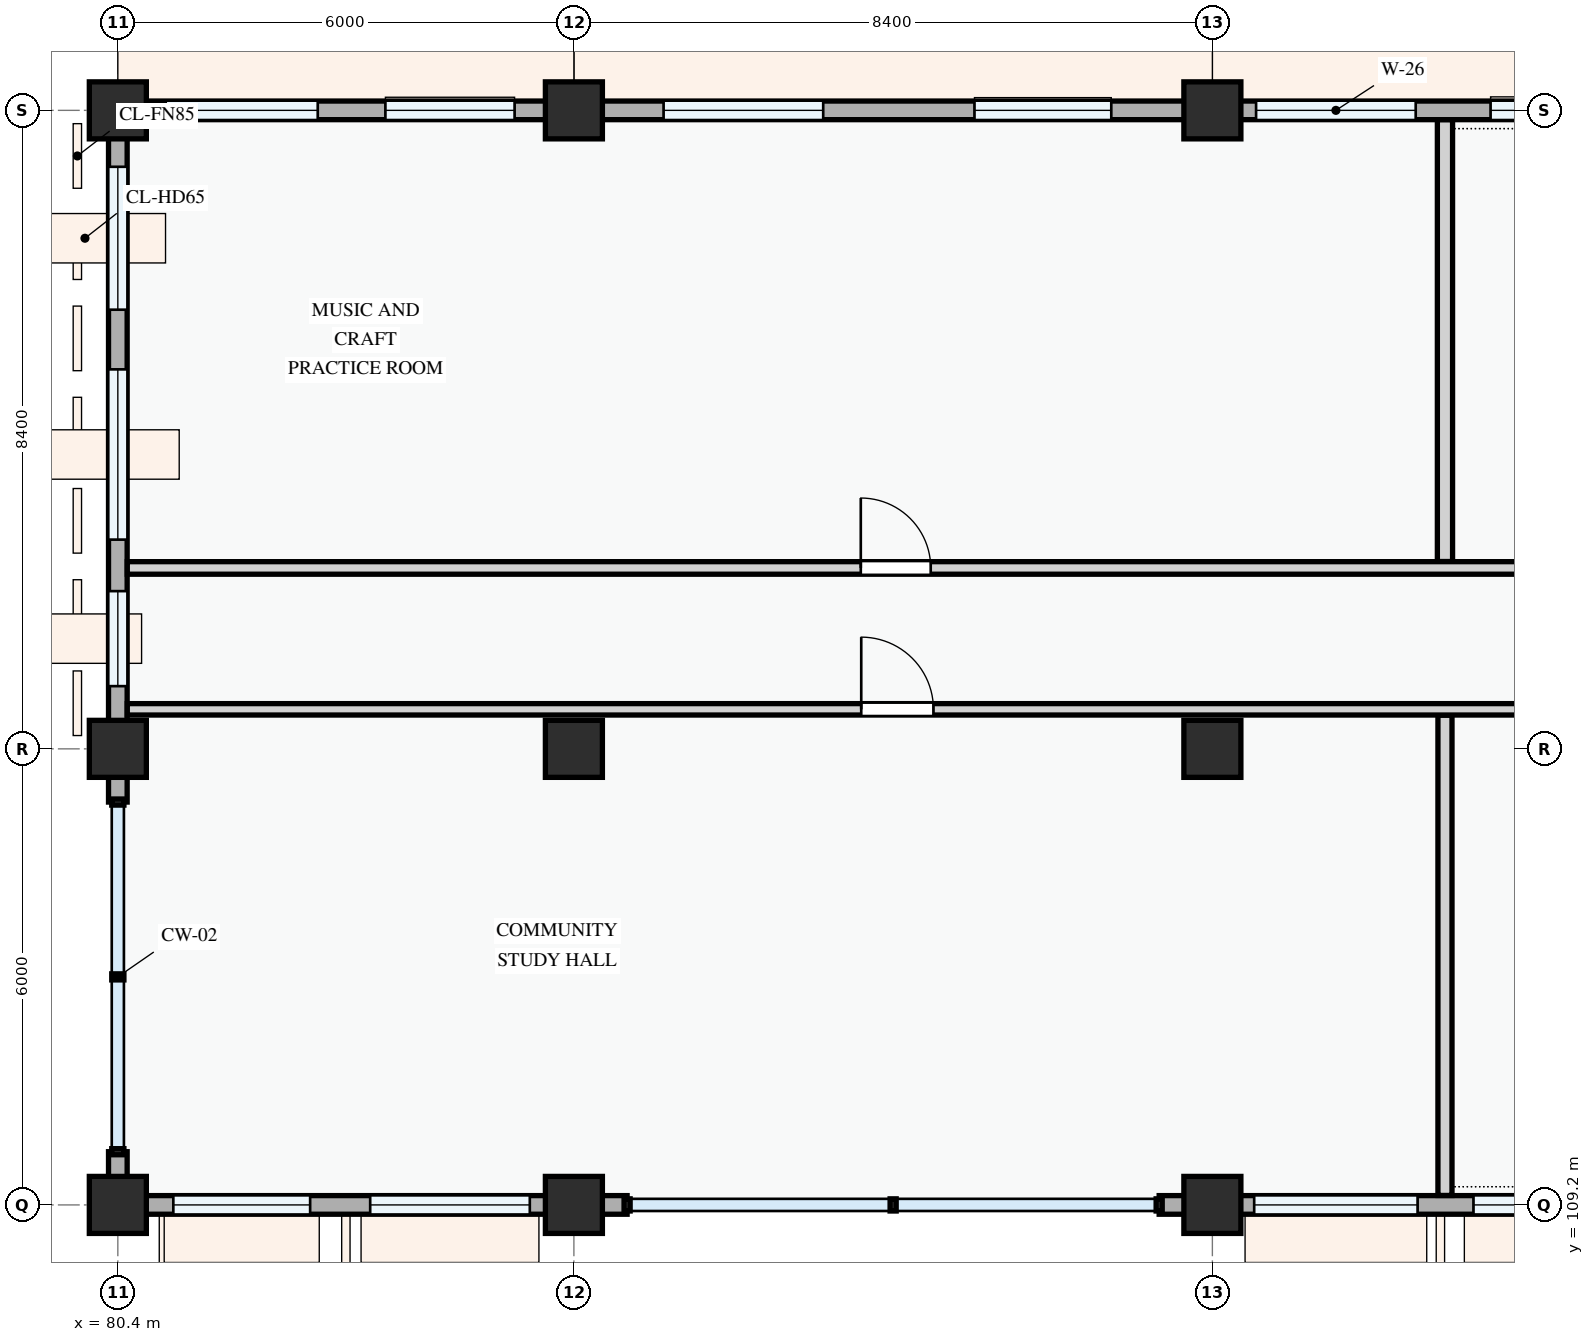
"""IFC4 building model, lengths in metres.
Left out: names, types, materials, properties, quantities, classifications, styles, units other than length and angle.
Written with IfcOpenShell. Run it as: python <this file> out.ifc"""

import sys

from ifc_helpers import new_model, si_unit, direction, frame, frame_2d, origin, origin_2d, place, context, subcontext, project, spatial, rectangle, extrude, element, fill, save


model = new_model("IFC4")
c1 = context("Model", 3, precision=1e-05, world=origin(), true_north=direction((0.0, 1.0)))
c2 = subcontext(c1, "Body", "Model", "MODEL_VIEW")
j1 = project(units=[si_unit("LENGTHUNIT", "METRE"), si_unit("PLANEANGLEUNIT", "RADIAN")], contexts=[c1])
p1 = place(None, origin())
s1 = spatial("IfcSite", under=j1, at=p1, CompositionType="ELEMENT")
p2 = place(p1, origin())
s2 = spatial("IfcBuilding", under=s1, at=p2, CompositionType="ELEMENT")
p3 = place(p2, frame((0.0, 0.0, 4.5)))
s3 = spatial("IfcBuildingStorey", under=s2, at=p3, CompositionType="ELEMENT", Elevation=4.5)
for number, where, z_axis, x_axis in (
    (1, (80.4, 109.2, 0.0), (0.0, 0.0, 1.0), (1.0, 0.0, 0.0)),
    (2, (80.4, 115.2, 0.0), (0.0, 0.0, 1.0), (1.0, 0.0, 0.0)),
    (3, (80.4, 123.6, 0.0), (0.0, 0.0, 1.0), (1.0, 0.0, 0.0)),
    (4, (86.4, 109.2, 0.0), (0.0, 0.0, 1.0), (1.0, 0.0, 0.0)),
    (5, (86.4, 115.2, 0.0), (0.0, 0.0, 1.0), (1.0, 0.0, 0.0)),
    (6, (86.4, 123.6, 0.0), (0.0, 0.0, 1.0), (1.0, 0.0, 0.0)),
    (7, (94.8, 109.2, 0.0), (0.0, 0.0, 1.0), (1.0, 0.0, 0.0)),
    (8, (94.8, 115.2, 0.0), (0.0, 0.0, 1.0), (1.0, 0.0, 0.0)),
    (9, (94.8, 123.6, 0.0), (0.0, 0.0, 1.0), (1.0, 0.0, 0.0)),
):
    element("IfcColumn", number, at=place(p3, frame(where, z_axis=z_axis, x_axis=x_axis)), inside=s3, PredefinedType="COLUMN", context=c2, shape_type="SweptSolid", body=[
        extrude(rectangle(XDim=0.75, YDim=0.75, at=origin_2d()), origin(), (0.0, 0.0, 1.0), 3.6),
    ])
p4 = place(p3, frame((100.8, 123.6, 0.0), z_axis=(0.0, 0.0, 1.0), x_axis=(-1.0, 0.0, 0.0)))
e10 = element("IfcWall", 10, at=p4, inside=s3, PredefinedType="STANDARD", context=c2, shape_type="SweptSolid", body=[
    extrude(rectangle(XDim=6.0, YDim=0.245, at=frame_2d((3.0, 0.0))), origin(), (0.0, 0.0, 1.0), 2.775),
])
p5 = place(p4, frame((0.79, 0.0, 0.78)))
e11 = element("IfcOpeningElement", 11, at=p5, cuts=e10, PredefinedType="OPENING", context=c2, shape_type="SweptSolid", body=[
    extrude(rectangle(XDim=1.55, YDim=1.4, at=frame_2d((0.775, 0.7))), frame((0.0, 0.133, 0.0), z_axis=(0.0, -1.0, 0.0), x_axis=(1.0, 0.0, 0.0)), (0.0, 0.0, 1.0), 0.265),
])
p6 = place(p4, frame((3.325, 0.0, 0.78)))
e12 = element("IfcOpeningElement", 12, at=p6, cuts=e10, PredefinedType="OPENING", context=c2, shape_type="SweptSolid", body=[
    extrude(rectangle(XDim=2.1, YDim=1.55, at=frame_2d((1.05, 0.775))), frame((0.0, 0.133, 0.0), z_axis=(0.0, -1.0, 0.0), x_axis=(1.0, 0.0, 0.0)), (0.0, 0.0, 1.0), 0.265),
])
p7 = place(p3, frame((94.8, 123.6, 0.0), z_axis=(0.0, 0.0, 1.0), x_axis=(-1.0, 0.0, 0.0)))
e13 = element("IfcWall", 13, at=p7, inside=s3, PredefinedType="STANDARD", context=c2, shape_type="SweptSolid", body=[
    extrude(rectangle(XDim=8.4, YDim=0.245, at=frame_2d((4.2, 0.0))), origin(), (0.0, 0.0, 1.0), 2.675),
])
p8 = place(p7, frame((1.33, 0.0, 0.78)))
e14 = element("IfcOpeningElement", 14, at=p8, cuts=e13, PredefinedType="OPENING", context=c2, shape_type="SweptSolid", body=[
    extrude(rectangle(XDim=1.8, YDim=1.7, at=frame_2d((0.9, 0.85))), frame((0.0, 0.133, 0.0), z_axis=(0.0, -1.0, 0.0), x_axis=(1.0, 0.0, 0.0)), (0.0, 0.0, 1.0), 0.265),
])
p9 = place(p7, frame((5.12, 0.0, 0.78)))
e15 = element("IfcOpeningElement", 15, at=p9, cuts=e13, PredefinedType="OPENING", context=c2, shape_type="SweptSolid", body=[
    extrude(rectangle(XDim=2.1, YDim=1.55, at=frame_2d((1.05, 0.775))), frame((0.0, 0.133, 0.0), z_axis=(0.0, -1.0, 0.0), x_axis=(1.0, 0.0, 0.0)), (0.0, 0.0, 1.0), 0.265),
])
p10 = place(p3, frame((86.4, 123.6, 0.0), z_axis=(0.0, 0.0, 1.0), x_axis=(-1.0, 0.0, 0.0)))
e16 = element("IfcWall", 16, at=p10, inside=s3, PredefinedType="STANDARD", context=c2, shape_type="SweptSolid", body=[
    extrude(rectangle(XDim=6.0, YDim=0.245, at=frame_2d((3.0, 0.0))), origin(), (0.0, 0.0, 1.0), 2.775),
])
p11 = place(p10, frame((0.78, 0.0, 0.78)))
e17 = element("IfcOpeningElement", 17, at=p11, cuts=e16, PredefinedType="OPENING", context=c2, shape_type="SweptSolid", body=[
    extrude(rectangle(XDim=1.7, YDim=1.6, at=frame_2d((0.85, 0.8))), frame((0.0, 0.133, 0.0), z_axis=(0.0, -1.0, 0.0), x_axis=(1.0, 0.0, 0.0)), (0.0, 0.0, 1.0), 0.265),
])
p12 = place(p10, frame((3.37, 0.0, 0.78)))
e18 = element("IfcOpeningElement", 18, at=p12, cuts=e16, PredefinedType="OPENING", context=c2, shape_type="SweptSolid", body=[
    extrude(rectangle(XDim=2.0, YDim=1.5, at=frame_2d((1.0, 0.75))), frame((0.0, 0.133, 0.0), z_axis=(0.0, -1.0, 0.0), x_axis=(1.0, 0.0, 0.0)), (0.0, 0.0, 1.0), 0.265),
])
p13 = place(p3, frame((80.4, 123.6, 0.0), z_axis=(0.0, 0.0, 1.0), x_axis=(0.0, -1.0, 0.0)))
e19 = element("IfcWall", 19, at=p13, inside=s3, PredefinedType="STANDARD", context=c2, shape_type="SweptSolid", body=[
    extrude(rectangle(XDim=8.4, YDim=0.245, at=frame_2d((4.2, 0.0))), origin(), (0.0, 0.0, 1.0), 2.725),
])
p14 = place(p13, frame((0.742, 0.0, 0.78)))
e20 = element("IfcOpeningElement", 20, at=p14, cuts=e19, PredefinedType="OPENING", context=c2, shape_type="SweptSolid", body=[
    extrude(rectangle(XDim=1.88, YDim=1.52, at=frame_2d((0.94, 0.76))), frame((0.0, 0.133, 0.0), z_axis=(0.0, -1.0, 0.0), x_axis=(1.0, 0.0, 0.0)), (0.0, 0.0, 1.0), 0.265),
])
p15 = place(p13, frame((3.407, 0.0, 0.78)))
e21 = element("IfcOpeningElement", 21, at=p15, cuts=e19, PredefinedType="OPENING", context=c2, shape_type="SweptSolid", body=[
    extrude(rectangle(XDim=2.24, YDim=1.52, at=frame_2d((1.12, 0.76))), frame((0.0, 0.133, 0.0), z_axis=(0.0, -1.0, 0.0), x_axis=(1.0, 0.0, 0.0)), (0.0, 0.0, 1.0), 0.265),
])
p16 = place(p13, frame((6.325, 0.0, 0.78)))
e22 = element("IfcOpeningElement", 22, at=p16, cuts=e19, PredefinedType="OPENING", context=c2, shape_type="SweptSolid", body=[
    extrude(rectangle(XDim=1.25, YDim=1.3, at=frame_2d((0.625, 0.65))), frame((0.0, 0.133, 0.0), z_axis=(0.0, -1.0, 0.0), x_axis=(1.0, 0.0, 0.0)), (0.0, 0.0, 1.0), 0.265),
])
p17 = place(p3, frame((80.4, 115.2, 0.0), z_axis=(0.0, 0.0, 1.0), x_axis=(0.0, -1.0, 0.0)))
e23 = element("IfcWall", 23, at=p17, inside=s3, PredefinedType="STANDARD", context=c2, shape_type="SweptSolid", body=[
    extrude(rectangle(XDim=0.7, YDim=0.245, at=frame_2d((0.35, 0.0))), origin(), (0.0, 0.0, 1.0), 2.875),
])
p18 = place(p3, frame((80.4, 109.9, 0.0), z_axis=(0.0, 0.0, 1.0), x_axis=(0.0, -1.0, 0.0)))
e24 = element("IfcWall", 24, at=p18, inside=s3, PredefinedType="STANDARD", context=c2, shape_type="SweptSolid", body=[
    extrude(rectangle(XDim=0.575, YDim=0.245, at=frame_2d((0.288, 0.0))), origin(), (0.0, 0.0, 1.0), 2.875),
])
p19 = place(p3, frame((80.4, 109.2, 0.0), z_axis=(0.0, 0.0, 1.0), x_axis=(1.0, 0.0, 0.0)))
e25 = element("IfcWall", 25, at=p19, inside=s3, PredefinedType="STANDARD", context=c2, shape_type="SweptSolid", body=[
    extrude(rectangle(XDim=6.0, YDim=0.245, at=frame_2d((3.0, 0.0))), origin(), (0.0, 0.0, 1.0), 2.775),
])
p20 = place(p19, frame((0.73, 0.0, 0.78)))
e26 = element("IfcOpeningElement", 26, at=p20, cuts=e25, PredefinedType="OPENING", context=c2, shape_type="SweptSolid", body=[
    extrude(rectangle(XDim=1.8, YDim=1.7, at=frame_2d((0.9, 0.85))), frame((0.0, 0.133, 0.0), z_axis=(0.0, -1.0, 0.0), x_axis=(1.0, 0.0, 0.0)), (0.0, 0.0, 1.0), 0.265),
])
p21 = place(p19, frame((3.32, 0.0, 0.78)))
e27 = element("IfcOpeningElement", 27, at=p21, cuts=e25, PredefinedType="OPENING", context=c2, shape_type="SweptSolid", body=[
    extrude(rectangle(XDim=2.1, YDim=1.55, at=frame_2d((1.05, 0.775))), frame((0.0, 0.133, 0.0), z_axis=(0.0, -1.0, 0.0), x_axis=(1.0, 0.0, 0.0)), (0.0, 0.0, 1.0), 0.265),
])
p22 = place(p3, frame((86.4, 109.2, 0.0), z_axis=(0.0, 0.0, 1.0), x_axis=(1.0, 0.0, 0.0)))
e28 = element("IfcWall", 28, at=p22, inside=s3, PredefinedType="STANDARD", context=c2, shape_type="SweptSolid", body=[
    extrude(rectangle(XDim=0.7, YDim=0.245, at=frame_2d((0.35, 0.0))), origin(), (0.0, 0.0, 1.0), 2.675),
])
p23 = place(p3, frame((94.1, 109.2, 0.0), z_axis=(0.0, 0.0, 1.0), x_axis=(1.0, 0.0, 0.0)))
e29 = element("IfcWall", 29, at=p23, inside=s3, PredefinedType="STANDARD", context=c2, shape_type="SweptSolid", body=[
    extrude(rectangle(XDim=0.7, YDim=0.245, at=frame_2d((0.35, 0.0))), origin(), (0.0, 0.0, 1.0), 2.675),
])
p24 = place(p3, frame((94.8, 109.2, 0.0), z_axis=(0.0, 0.0, 1.0), x_axis=(1.0, 0.0, 0.0)))
e30 = element("IfcWall", 30, at=p24, inside=s3, PredefinedType="STANDARD", context=c2, shape_type="SweptSolid", body=[
    extrude(rectangle(XDim=6.0, YDim=0.245, at=frame_2d((3.0, 0.0))), origin(), (0.0, 0.0, 1.0), 2.775),
])
p25 = place(p24, frame((0.55, 0.0, 0.78)))
e31 = element("IfcOpeningElement", 31, at=p25, cuts=e30, PredefinedType="OPENING", context=c2, shape_type="SweptSolid", body=[
    extrude(rectangle(XDim=2.15, YDim=1.65, at=frame_2d((1.075, 0.825))), frame((0.0, 0.133, 0.0), z_axis=(0.0, -1.0, 0.0), x_axis=(1.0, 0.0, 0.0)), (0.0, 0.0, 1.0), 0.265),
])
p26 = place(p24, frame((3.435, 0.0, 0.78)))
e32 = element("IfcOpeningElement", 32, at=p26, cuts=e30, PredefinedType="OPENING", context=c2, shape_type="SweptSolid", body=[
    extrude(rectangle(XDim=2.0, YDim=1.75, at=frame_2d((1.0, 0.875))), frame((0.0, 0.133, 0.0), z_axis=(0.0, -1.0, 0.0), x_axis=(1.0, 0.0, 0.0)), (0.0, 0.0, 1.0), 0.265),
])
p27 = place(p3, frame((97.86, 109.324, 0.0), z_axis=(0.0, 0.0, 1.0), x_axis=(0.0, 1.0, 0.0)))
e33 = element("IfcWall", 33, at=p27, inside=s3, PredefinedType="PARTITIONING", context=c2, shape_type="SweptSolid", body=[
    extrude(rectangle(XDim=6.319, YDim=0.185, at=frame_2d((3.159, 0.0))), origin(), (0.0, 0.0, 1.0), 3.3),
])
p28 = place(p3, frame((97.86, 117.665, 0.0), z_axis=(0.0, 0.0, 1.0), x_axis=(0.0, 1.0, 0.0)))
e34 = element("IfcWall", 34, at=p28, inside=s3, PredefinedType="PARTITIONING", context=c2, shape_type="SweptSolid", body=[
    extrude(rectangle(XDim=5.811, YDim=0.2, at=frame_2d((2.906, 0.0))), origin(), (0.0, 0.0, 1.0), 3.3),
])
p29 = place(p3, frame((80.524, 115.72, 0.0), z_axis=(0.0, 0.0, 1.0), x_axis=(1.0, 0.0, 0.0)))
e35 = element("IfcWall", 35, at=p29, inside=s3, PredefinedType="PARTITIONING", context=c2, shape_type="SweptSolid", body=[
    extrude(rectangle(XDim=69.526, YDim=0.15, at=frame_2d((34.763, 0.0))), origin(), (0.0, 0.0, 1.0), 3.3),
])
p30 = place(p29, frame((9.656, 0.0, 0.0)))
e36 = element("IfcOpeningElement", 36, at=p30, cuts=e35, PredefinedType="OPENING", context=c2, shape_type="SweptSolid", body=[
    extrude(rectangle(XDim=0.95, YDim=2.1, at=frame_2d((0.475, 1.05))), frame((0.0, 0.085, 0.0), z_axis=(0.0, -1.0, 0.0), x_axis=(1.0, 0.0, 0.0)), (0.0, 0.0, 1.0), 0.17),
])
p31 = place(p29, frame((24.2, 0.0, 0.0)))
e37 = element("IfcOpeningElement", 37, at=p31, cuts=e35, PredefinedType="OPENING", context=c2, shape_type="SweptSolid", body=[
    extrude(rectangle(XDim=0.95, YDim=2.1, at=frame_2d((0.475, 1.05))), frame((0.0, 0.085, 0.0), z_axis=(0.0, -1.0, 0.0), x_axis=(1.0, 0.0, 0.0)), (0.0, 0.0, 1.0), 0.17),
])
p32 = place(p29, frame((38.208, 0.0, 0.0)))
e38 = element("IfcOpeningElement", 38, at=p32, cuts=e35, PredefinedType="OPENING", context=c2, shape_type="SweptSolid", body=[
    extrude(rectangle(XDim=0.95, YDim=2.1, at=frame_2d((0.475, 1.05))), frame((0.0, 0.085, 0.0), z_axis=(0.0, -1.0, 0.0), x_axis=(1.0, 0.0, 0.0)), (0.0, 0.0, 1.0), 0.17),
])
p33 = place(p29, frame((67.026, 0.0, 0.0)))
e39 = element("IfcOpeningElement", 39, at=p33, cuts=e35, PredefinedType="OPENING", context=c2, shape_type="SweptSolid", body=[
    extrude(rectangle(XDim=0.95, YDim=2.1, at=frame_2d((0.475, 1.05))), frame((0.0, 0.085, 0.0), z_axis=(0.0, -1.0, 0.0), x_axis=(1.0, 0.0, 0.0)), (0.0, 0.0, 1.0), 0.17),
])
p34 = place(p3, frame((80.524, 117.58, 0.0), z_axis=(0.0, 0.0, 1.0), x_axis=(1.0, 0.0, 0.0)))
e40 = element("IfcWall", 40, at=p34, inside=s3, PredefinedType="PARTITIONING", context=c2, shape_type="SweptSolid", body=[
    extrude(rectangle(XDim=72.016, YDim=0.165, at=frame_2d((36.008, 0.0))), origin(), (0.0, 0.0, 1.0), 3.3),
])
p35 = place(p34, frame((9.65, 0.0, 0.0)))
e41 = element("IfcOpeningElement", 41, at=p35, cuts=e40, PredefinedType="OPENING", context=c2, shape_type="SweptSolid", body=[
    extrude(rectangle(XDim=0.92, YDim=2.1, at=frame_2d((0.46, 1.05))), frame((0.0, 0.093, 0.0), z_axis=(0.0, -1.0, 0.0), x_axis=(1.0, 0.0, 0.0)), (0.0, 0.0, 1.0), 0.185),
])
p36 = place(p34, frame((24.197, 0.0, 0.0)))
e42 = element("IfcOpeningElement", 42, at=p36, cuts=e40, PredefinedType="OPENING", context=c2, shape_type="SweptSolid", body=[
    extrude(rectangle(XDim=0.96, YDim=2.12, at=frame_2d((0.48, 1.06))), frame((0.0, 0.093, 0.0), z_axis=(0.0, -1.0, 0.0), x_axis=(1.0, 0.0, 0.0)), (0.0, 0.0, 1.0), 0.185),
])
p37 = place(p34, frame((38.206, 0.0, 0.0)))
e43 = element("IfcOpeningElement", 43, at=p37, cuts=e40, PredefinedType="OPENING", context=c2, shape_type="SweptSolid", body=[
    extrude(rectangle(XDim=0.92, YDim=2.1, at=frame_2d((0.46, 1.05))), frame((0.0, 0.093, 0.0), z_axis=(0.0, -1.0, 0.0), x_axis=(1.0, 0.0, 0.0)), (0.0, 0.0, 1.0), 0.185),
])
p38 = place(p34, frame((67.017, 0.0, 0.0)))
e44 = element("IfcOpeningElement", 44, at=p38, cuts=e40, PredefinedType="OPENING", context=c2, shape_type="SweptSolid", body=[
    extrude(rectangle(XDim=0.92, YDim=2.1, at=frame_2d((0.46, 1.05))), frame((0.0, 0.093, 0.0), z_axis=(0.0, -1.0, 0.0), x_axis=(1.0, 0.0, 0.0)), (0.0, 0.0, 1.0), 0.185),
])
p39 = place(p5, origin())
e45 = element("IfcWindow", 45, at=p39, inside=s3, PartitioningType="SINGLE_PANEL", PredefinedType="WINDOW", context=c2, shape_type="SweptSolid", body=[
    extrude(rectangle(XDim=1.55, YDim=1.4, at=frame_2d((0.775, 0.7))), frame((0.0, 0.03, 0.0), z_axis=(0.0, -1.0, 0.0), x_axis=(1.0, 0.0, 0.0)), (0.0, 0.0, 1.0), 0.06),
])
fill(e11, e45)
p40 = place(p6, origin())
e46 = element("IfcWindow", 46, at=p40, inside=s3, PartitioningType="DOUBLE_PANEL_VERTICAL", PredefinedType="WINDOW", context=c2, shape_type="SweptSolid", body=[
    extrude(rectangle(XDim=2.1, YDim=1.55, at=frame_2d((1.05, 0.775))), frame((0.0, 0.03, 0.0), z_axis=(0.0, -1.0, 0.0), x_axis=(1.0, 0.0, 0.0)), (0.0, 0.0, 1.0), 0.06),
])
fill(e12, e46)
p41 = place(p8, origin())
e47 = element("IfcWindow", 47, at=p41, inside=s3, PartitioningType="DOUBLE_PANEL_VERTICAL", PredefinedType="WINDOW", context=c2, shape_type="SweptSolid", body=[
    extrude(rectangle(XDim=1.8, YDim=1.7, at=frame_2d((0.9, 0.85))), frame((0.0, 0.03, 0.0), z_axis=(0.0, -1.0, 0.0), x_axis=(1.0, 0.0, 0.0)), (0.0, 0.0, 1.0), 0.06),
])
fill(e14, e47)
p42 = place(p9, origin())
e48 = element("IfcWindow", 48, at=p42, inside=s3, PartitioningType="DOUBLE_PANEL_VERTICAL", PredefinedType="WINDOW", context=c2, shape_type="SweptSolid", body=[
    extrude(rectangle(XDim=2.1, YDim=1.55, at=frame_2d((1.05, 0.775))), frame((0.0, 0.03, 0.0), z_axis=(0.0, -1.0, 0.0), x_axis=(1.0, 0.0, 0.0)), (0.0, 0.0, 1.0), 0.06),
])
fill(e15, e48)
p43 = place(p11, origin())
e49 = element("IfcWindow", 49, at=p43, inside=s3, PartitioningType="DOUBLE_PANEL_VERTICAL", PredefinedType="WINDOW", context=c2, shape_type="SweptSolid", body=[
    extrude(rectangle(XDim=1.7, YDim=1.6, at=frame_2d((0.85, 0.8))), frame((0.0, 0.03, 0.0), z_axis=(0.0, -1.0, 0.0), x_axis=(1.0, 0.0, 0.0)), (0.0, 0.0, 1.0), 0.06),
])
fill(e17, e49)
p44 = place(p12, origin())
e50 = element("IfcWindow", 50, at=p44, inside=s3, PartitioningType="DOUBLE_PANEL_VERTICAL", PredefinedType="WINDOW", context=c2, shape_type="SweptSolid", body=[
    extrude(rectangle(XDim=2.0, YDim=1.5, at=frame_2d((1.0, 0.75))), frame((0.0, 0.03, 0.0), z_axis=(0.0, -1.0, 0.0), x_axis=(1.0, 0.0, 0.0)), (0.0, 0.0, 1.0), 0.06),
])
fill(e18, e50)
p45 = place(p14, origin())
e51 = element("IfcWindow", 51, at=p45, inside=s3, PartitioningType="DOUBLE_PANEL_VERTICAL", PredefinedType="WINDOW", context=c2, shape_type="SweptSolid", body=[
    extrude(rectangle(XDim=1.88, YDim=1.52, at=frame_2d((0.94, 0.76))), frame((0.0, 0.03, 0.0), z_axis=(0.0, -1.0, 0.0), x_axis=(1.0, 0.0, 0.0)), (0.0, 0.0, 1.0), 0.06),
])
fill(e20, e51)
p46 = place(p15, origin())
e52 = element("IfcWindow", 52, at=p46, inside=s3, PartitioningType="DOUBLE_PANEL_VERTICAL", PredefinedType="WINDOW", context=c2, shape_type="SweptSolid", body=[
    extrude(rectangle(XDim=2.24, YDim=1.52, at=frame_2d((1.12, 0.76))), frame((0.0, 0.03, 0.0), z_axis=(0.0, -1.0, 0.0), x_axis=(1.0, 0.0, 0.0)), (0.0, 0.0, 1.0), 0.06),
])
fill(e21, e52)
p47 = place(p16, origin())
e53 = element("IfcWindow", 53, at=p47, inside=s3, PartitioningType="SINGLE_PANEL", PredefinedType="WINDOW", context=c2, shape_type="SweptSolid", body=[
    extrude(rectangle(XDim=1.25, YDim=1.3, at=frame_2d((0.625, 0.65))), frame((0.0, 0.03, 0.0), z_axis=(0.0, -1.0, 0.0), x_axis=(1.0, 0.0, 0.0)), (0.0, 0.0, 1.0), 0.06),
])
fill(e22, e53)
p48 = place(p20, origin())
e54 = element("IfcWindow", 54, at=p48, inside=s3, PartitioningType="DOUBLE_PANEL_VERTICAL", PredefinedType="WINDOW", context=c2, shape_type="SweptSolid", body=[
    extrude(rectangle(XDim=1.8, YDim=1.7, at=frame_2d((0.9, 0.85))), frame((0.0, 0.03, 0.0), z_axis=(0.0, -1.0, 0.0), x_axis=(1.0, 0.0, 0.0)), (0.0, 0.0, 1.0), 0.06),
])
fill(e26, e54)
p49 = place(p21, origin())
e55 = element("IfcWindow", 55, at=p49, inside=s3, PartitioningType="DOUBLE_PANEL_VERTICAL", PredefinedType="WINDOW", context=c2, shape_type="SweptSolid", body=[
    extrude(rectangle(XDim=2.1, YDim=1.55, at=frame_2d((1.05, 0.775))), frame((0.0, 0.03, 0.0), z_axis=(0.0, -1.0, 0.0), x_axis=(1.0, 0.0, 0.0)), (0.0, 0.0, 1.0), 0.06),
])
fill(e27, e55)
p50 = place(p25, origin())
e56 = element("IfcWindow", 56, at=p50, inside=s3, PartitioningType="DOUBLE_PANEL_VERTICAL", PredefinedType="WINDOW", context=c2, shape_type="SweptSolid", body=[
    extrude(rectangle(XDim=2.15, YDim=1.65, at=frame_2d((1.075, 0.825))), frame((0.0, 0.03, 0.0), z_axis=(0.0, -1.0, 0.0), x_axis=(1.0, 0.0, 0.0)), (0.0, 0.0, 1.0), 0.06),
])
fill(e31, e56)
p51 = place(p26, origin())
e57 = element("IfcWindow", 57, at=p51, inside=s3, PartitioningType="DOUBLE_PANEL_VERTICAL", PredefinedType="WINDOW", context=c2, shape_type="SweptSolid", body=[
    extrude(rectangle(XDim=2.0, YDim=1.75, at=frame_2d((1.0, 0.875))), frame((0.0, 0.03, 0.0), z_axis=(0.0, -1.0, 0.0), x_axis=(1.0, 0.0, 0.0)), (0.0, 0.0, 1.0), 0.06),
])
fill(e32, e57)
p52 = place(p30, origin())
e58 = element("IfcDoor", 58, at=p52, inside=s3, OperationType="SINGLE_SWING_LEFT", PredefinedType="DOOR", context=c2, shape_type="SweptSolid", body=[
    extrude(rectangle(XDim=0.95, YDim=2.1, at=frame_2d((0.475, 1.05))), frame((0.0, 0.025, 0.0), z_axis=(0.0, -1.0, 0.0), x_axis=(1.0, 0.0, 0.0)), (0.0, 0.0, 1.0), 0.05),
])
fill(e36, e58)
p53 = place(p35, origin())
e59 = element("IfcDoor", 59, at=p53, inside=s3, OperationType="SINGLE_SWING_LEFT", PredefinedType="DOOR", context=c2, shape_type="SweptSolid", body=[
    extrude(rectangle(XDim=0.92, YDim=2.1, at=frame_2d((0.46, 1.05))), frame((0.0, 0.025, 0.0), z_axis=(0.0, -1.0, 0.0), x_axis=(1.0, 0.0, 0.0)), (0.0, 0.0, 1.0), 0.05),
])
fill(e41, e59)
save(model, sys.argv[1])
